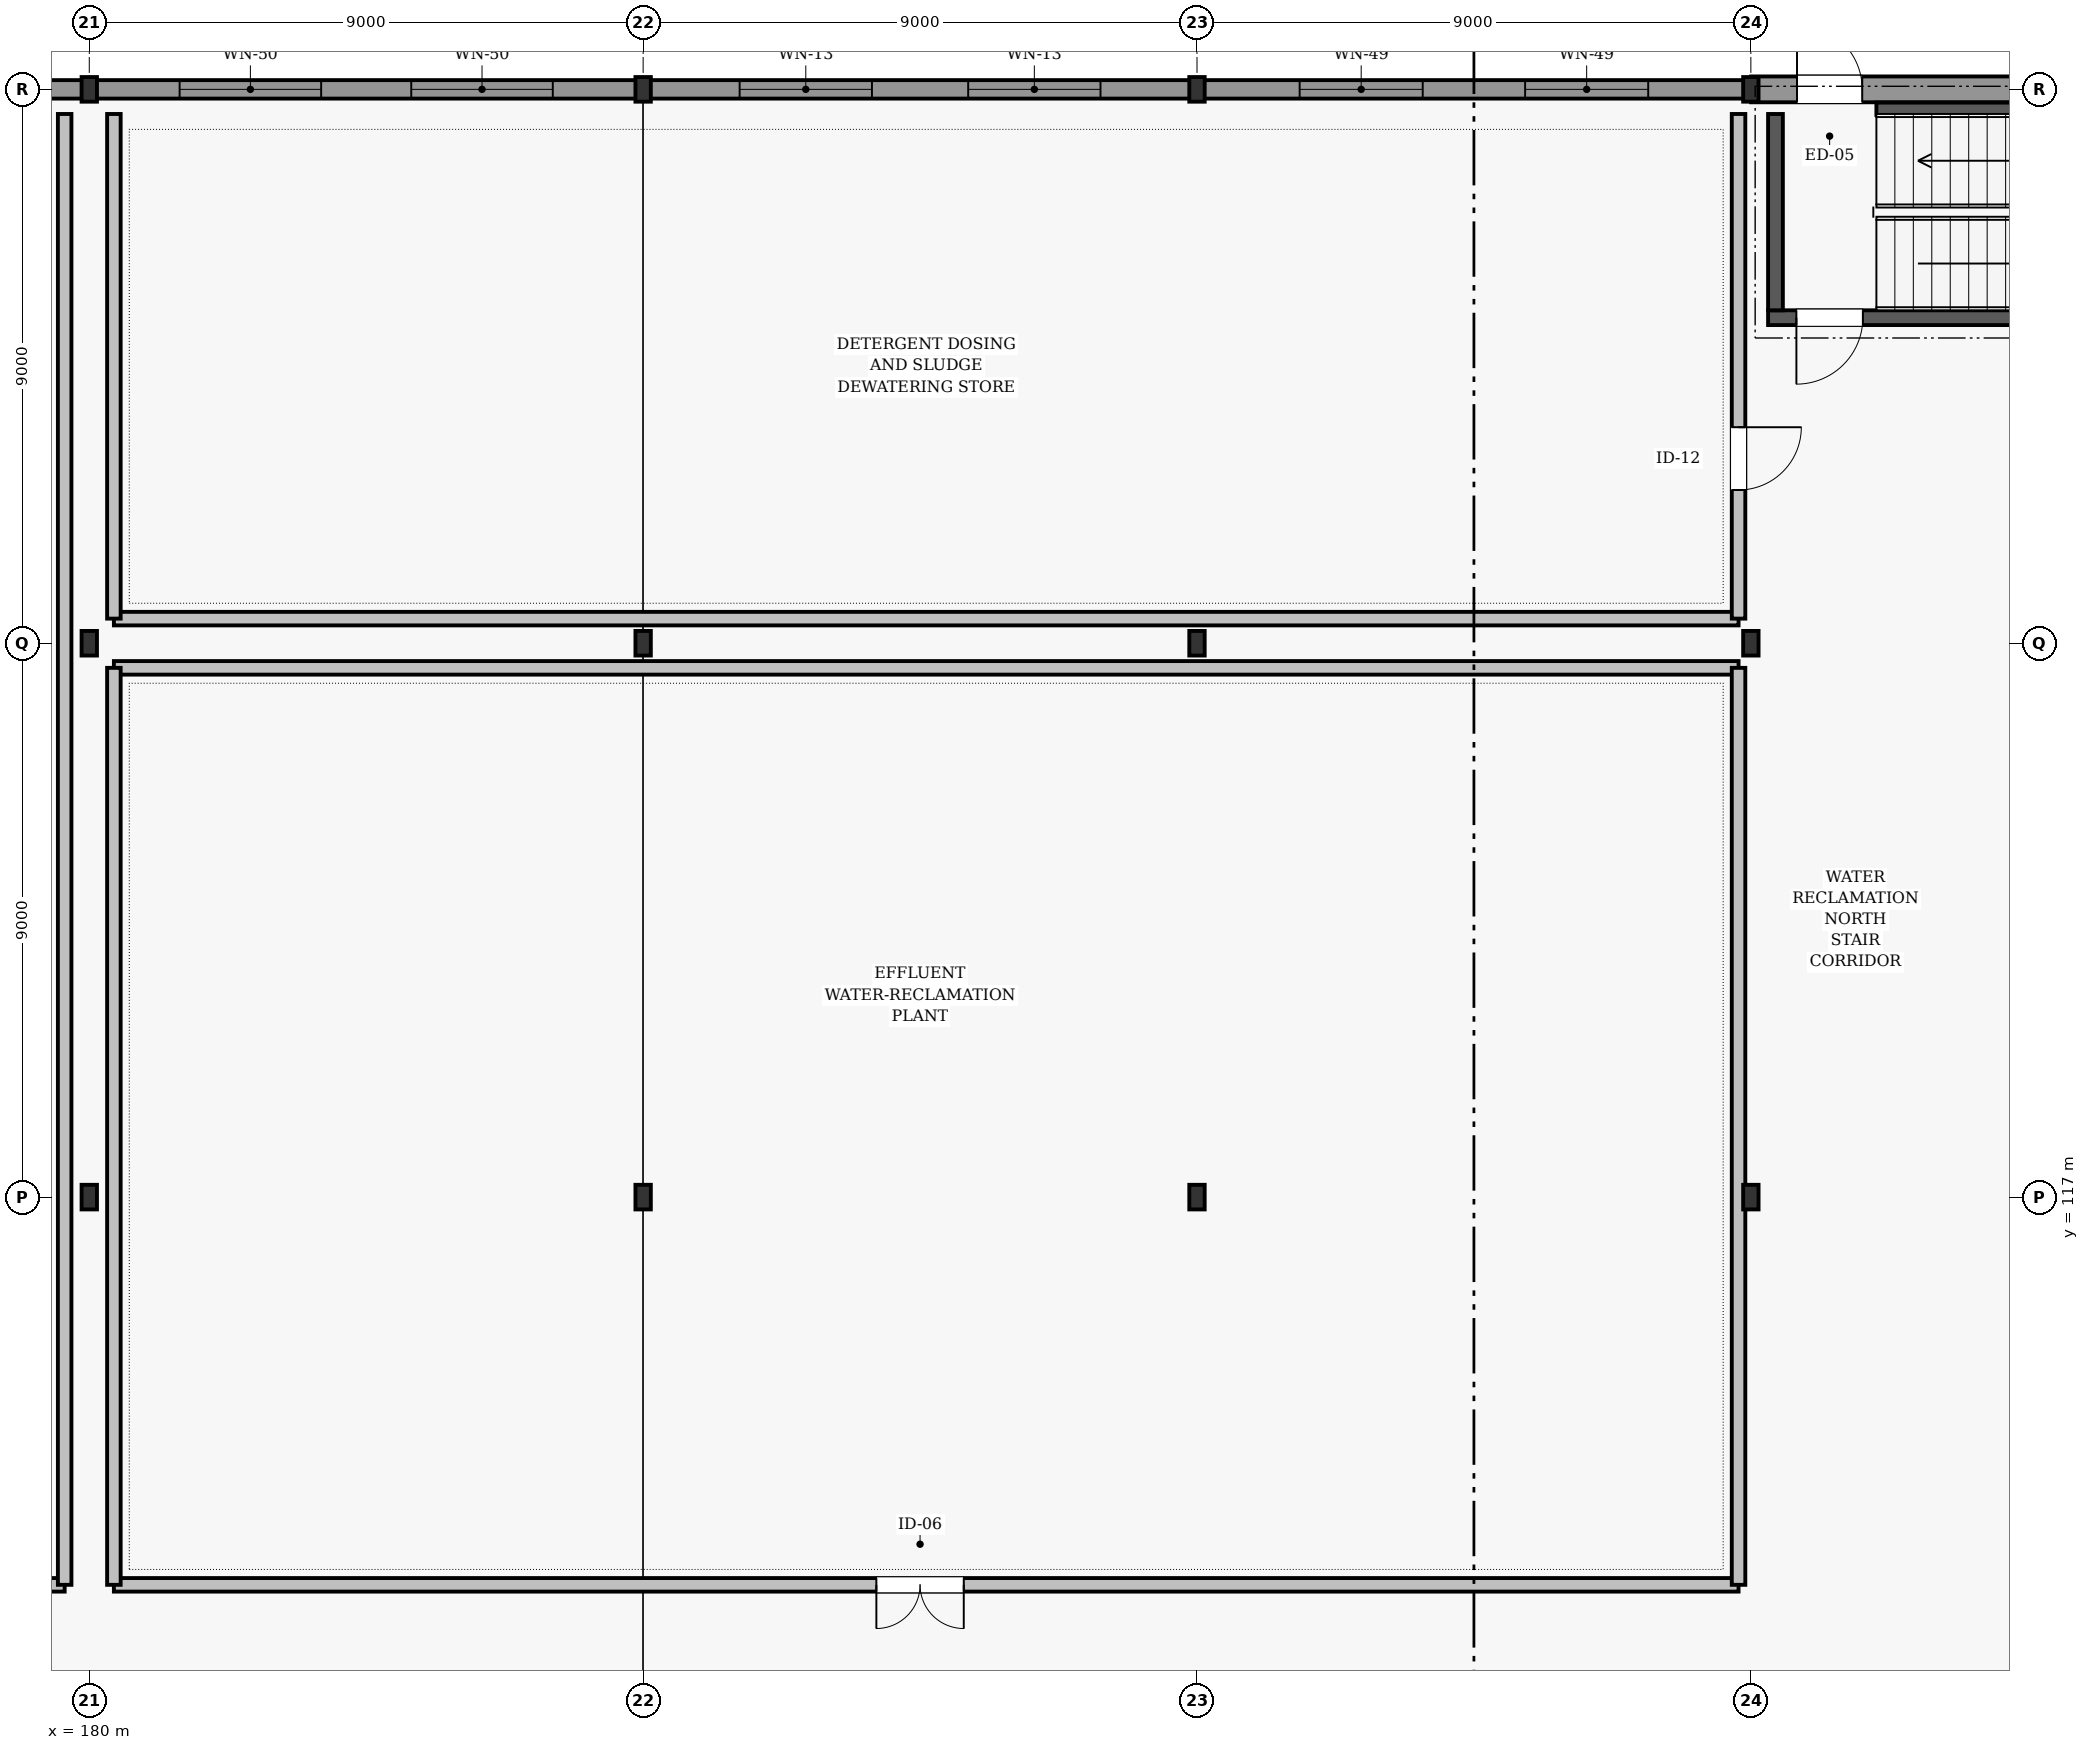
"""IFC4 building model, lengths in metres.
Left out: names, types, materials, properties, quantities, classifications, styles, units other than length and angle.
Written with IfcOpenShell. Run it as: python <this file> out.ifc"""

import sys

from ifc_helpers import new_model, si_unit, direction, frame, frame_2d, origin, origin_2d, place, context, subcontext, project, spatial, rectangle, i_section, extrude, element, fill, save


model = new_model("IFC4")
c1 = context("Model", 3, precision=1e-05, world=origin(), true_north=direction((0.0, 1.0)))
c2 = subcontext(c1, "Body", "Model", "MODEL_VIEW")
j1 = project(units=[si_unit("LENGTHUNIT", "METRE"), si_unit("PLANEANGLEUNIT", "RADIAN")], contexts=[c1])
p1 = place(None, origin())
s1 = spatial("IfcSite", under=j1, at=p1, CompositionType="ELEMENT")
p2 = place(p1, origin())
s2 = spatial("IfcBuilding", under=s1, at=p2, CompositionType="ELEMENT")
p3 = place(p2, origin())
s3 = spatial("IfcBuildingStorey", under=s2, at=p3, CompositionType="ELEMENT", Elevation=0.0)
for number, where, z_axis, x_axis in (
    (1, (180.0, 117.0, 0.0), (0.0, 0.0, 1.0), (1.0, 0.0, 0.0)),
    (2, (180.0, 126.0, 0.0), (0.0, 0.0, 1.0), (1.0, 0.0, 0.0)),
    (3, (180.0, 135.0, 0.0), (0.0, 0.0, 1.0), (1.0, 0.0, 0.0)),
    (4, (189.0, 117.0, 0.0), (0.0, 0.0, 1.0), (1.0, 0.0, 0.0)),
    (5, (189.0, 126.0, 0.0), (0.0, 0.0, 1.0), (1.0, 0.0, 0.0)),
    (6, (189.0, 135.0, 0.0), (0.0, 0.0, 1.0), (1.0, 0.0, 0.0)),
    (7, (198.0, 117.0, 0.0), (0.0, 0.0, 1.0), (1.0, 0.0, 0.0)),
    (8, (198.0, 126.0, 0.0), (0.0, 0.0, 1.0), (1.0, 0.0, 0.0)),
    (9, (198.0, 135.0, 0.0), (0.0, 0.0, 1.0), (1.0, 0.0, 0.0)),
    (10, (207.0, 117.0, 0.0), (0.0, 0.0, 1.0), (1.0, 0.0, 0.0)),
    (11, (207.0, 126.0, 0.0), (0.0, 0.0, 1.0), (1.0, 0.0, 0.0)),
    (12, (207.0, 135.0, 0.0), (0.0, 0.0, 1.0), (1.0, 0.0, 0.0)),
):
    element("IfcColumn", number, at=place(p3, frame(where, z_axis=z_axis, x_axis=x_axis)), inside=s3, PredefinedType="COLUMN", context=c2, shape_type="SweptSolid", body=[
        extrude(i_section(OverallWidth=0.25, OverallDepth=0.4, WebThickness=0.01, FlangeThickness=0.013, FilletRadius=0.014, at=origin_2d()), origin(), (0.0, 0.0, 1.0), 4.8),
    ])
p4 = place(p3, frame((171.004, 135.0, 0.0), z_axis=(0.0, 0.0, 1.0), x_axis=(1.0, 0.0, 0.0)))
e13 = element("IfcWall", 13, at=p4, inside=s3, PredefinedType="SOLIDWALL", context=c2, shape_type="SweptSolid", body=[
    extrude(rectangle(XDim=8.992, YDim=0.3, at=frame_2d((4.496, 0.0))), origin(), (0.0, 0.0, 1.0), 3.912),
])
p5 = place(p4, frame((1.364, 0.0, 1.45)))
e14 = element("IfcOpeningElement", 14, at=p5, cuts=e13, PredefinedType="OPENING", context=c2, shape_type="SweptSolid", body=[
    extrude(rectangle(XDim=2.45, YDim=1.2, at=frame_2d((1.225, 0.6))), frame((0.0, 0.16, 0.0), z_axis=(0.0, -1.0, 0.0), x_axis=(1.0, 0.0, 0.0)), (0.0, 0.0, 1.0), 0.32),
])
p6 = place(p4, frame((5.178, 0.0, 1.45)))
e15 = element("IfcOpeningElement", 15, at=p6, cuts=e13, PredefinedType="OPENING", context=c2, shape_type="SweptSolid", body=[
    extrude(rectangle(XDim=2.45, YDim=1.2, at=frame_2d((1.225, 0.6))), frame((0.0, 0.16, 0.0), z_axis=(0.0, -1.0, 0.0), x_axis=(1.0, 0.0, 0.0)), (0.0, 0.0, 1.0), 0.32),
])
p7 = place(p3, frame((180.004, 135.0, 0.0), z_axis=(0.0, 0.0, 1.0), x_axis=(1.0, 0.0, 0.0)))
e16 = element("IfcWall", 16, at=p7, inside=s3, PredefinedType="SOLIDWALL", context=c2, shape_type="SweptSolid", body=[
    extrude(rectangle(XDim=8.992, YDim=0.3, at=frame_2d((4.496, 0.0))), origin(), (0.0, 0.0, 1.0), 3.912),
])
p8 = place(p7, frame((1.464, 0.0, 1.5)))
e17 = element("IfcOpeningElement", 17, at=p8, cuts=e16, PredefinedType="OPENING", context=c2, shape_type="SweptSolid", body=[
    extrude(rectangle(XDim=2.3, YDim=1.16, at=frame_2d((1.15, 0.58))), frame((0.0, 0.16, 0.0), z_axis=(0.0, -1.0, 0.0), x_axis=(1.0, 0.0, 0.0)), (0.0, 0.0, 1.0), 0.32),
])
p9 = place(p7, frame((5.228, 0.0, 1.5)))
e18 = element("IfcOpeningElement", 18, at=p9, cuts=e16, PredefinedType="OPENING", context=c2, shape_type="SweptSolid", body=[
    extrude(rectangle(XDim=2.3, YDim=1.16, at=frame_2d((1.15, 0.58))), frame((0.0, 0.16, 0.0), z_axis=(0.0, -1.0, 0.0), x_axis=(1.0, 0.0, 0.0)), (0.0, 0.0, 1.0), 0.32),
])
p10 = place(p3, frame((189.004, 135.0, 0.0), z_axis=(0.0, 0.0, 1.0), x_axis=(1.0, 0.0, 0.0)))
e19 = element("IfcWall", 19, at=p10, inside=s3, PredefinedType="SOLIDWALL", context=c2, shape_type="SweptSolid", body=[
    extrude(rectangle(XDim=8.992, YDim=0.3, at=frame_2d((4.496, 0.0))), origin(), (0.0, 0.0, 1.0), 3.912),
])
p11 = place(p10, frame((1.564, 0.0, 1.5)))
e20 = element("IfcOpeningElement", 20, at=p11, cuts=e19, PredefinedType="OPENING", context=c2, shape_type="SweptSolid", body=[
    extrude(rectangle(XDim=2.15, YDim=1.12, at=frame_2d((1.075, 0.56))), frame((0.0, 0.16, 0.0), z_axis=(0.0, -1.0, 0.0), x_axis=(1.0, 0.0, 0.0)), (0.0, 0.0, 1.0), 0.32),
])
p12 = place(p10, frame((5.278, 0.0, 1.5)))
e21 = element("IfcOpeningElement", 21, at=p12, cuts=e19, PredefinedType="OPENING", context=c2, shape_type="SweptSolid", body=[
    extrude(rectangle(XDim=2.15, YDim=1.12, at=frame_2d((1.075, 0.56))), frame((0.0, 0.16, 0.0), z_axis=(0.0, -1.0, 0.0), x_axis=(1.0, 0.0, 0.0)), (0.0, 0.0, 1.0), 0.32),
])
p13 = place(p3, frame((198.004, 135.0, 0.0), z_axis=(0.0, 0.0, 1.0), x_axis=(1.0, 0.0, 0.0)))
e22 = element("IfcWall", 22, at=p13, inside=s3, PredefinedType="SOLIDWALL", context=c2, shape_type="SweptSolid", body=[
    extrude(rectangle(XDim=8.992, YDim=0.3, at=frame_2d((4.496, 0.0))), origin(), (0.0, 0.0, 1.0), 3.912),
])
p14 = place(p13, frame((1.664, 0.0, 1.5)))
e23 = element("IfcOpeningElement", 23, at=p14, cuts=e22, PredefinedType="OPENING", context=c2, shape_type="SweptSolid", body=[
    extrude(rectangle(XDim=2.0, YDim=1.08, at=frame_2d((1.0, 0.54))), frame((0.0, 0.16, 0.0), z_axis=(0.0, -1.0, 0.0), x_axis=(1.0, 0.0, 0.0)), (0.0, 0.0, 1.0), 0.32),
])
p15 = place(p13, frame((5.328, 0.0, 1.5)))
e24 = element("IfcOpeningElement", 24, at=p15, cuts=e22, PredefinedType="OPENING", context=c2, shape_type="SweptSolid", body=[
    extrude(rectangle(XDim=2.0, YDim=1.08, at=frame_2d((1.0, 0.54))), frame((0.0, 0.16, 0.0), z_axis=(0.0, -1.0, 0.0), x_axis=(1.0, 0.0, 0.0)), (0.0, 0.0, 1.0), 0.32),
])
p16 = place(p3, frame((207.004, 135.0, 0.0), z_axis=(0.0, 0.0, 1.0), x_axis=(1.0, 0.0, 0.0)))
e25 = element("IfcWall", 25, at=p16, inside=s3, PredefinedType="SOLIDWALL", context=c2, shape_type="SweptSolid", body=[
    extrude(rectangle(XDim=8.992, YDim=0.42, at=frame_2d((4.496, 0.0))), origin(), (0.0, 0.0, 1.0), 3.912),
])
p17 = place(p16, frame((0.746, 0.0, 0.0)))
e26 = element("IfcOpeningElement", 26, at=p17, cuts=e25, PredefinedType="OPENING", context=c2, shape_type="SweptSolid", body=[
    extrude(rectangle(XDim=1.06, YDim=2.1, at=frame_2d((0.53, 1.05))), frame((0.0, 0.22, 0.0), z_axis=(0.0, -1.0, 0.0), x_axis=(1.0, 0.0, 0.0)), (0.0, 0.0, 1.0), 0.44),
])
p18 = place(p3, frame((207.28, 131.29, 0.0), z_axis=(0.0, 0.0, 1.0), x_axis=(1.0, 0.0, 0.0)))
e27 = element("IfcWall", 27, at=p18, inside=s3, PredefinedType="SHEAR", context=c2, shape_type="SweptSolid", body=[
    extrude(rectangle(XDim=8.44, YDim=0.24, at=frame_2d((4.22, 0.0))), origin(), (0.0, 0.0, 1.0), 4.55),
])
p19 = place(p18, frame((0.46, 0.0, 0.0)))
e28 = element("IfcOpeningElement", 28, at=p19, cuts=e27, PredefinedType="OPENING", context=c2, shape_type="SweptSolid", body=[
    extrude(rectangle(XDim=1.08, YDim=2.08, at=frame_2d((0.54, 1.04))), frame((0.0, 0.13, 0.0), z_axis=(0.0, -1.0, 0.0), x_axis=(1.0, 0.0, 0.0)), (0.0, 0.0, 1.0), 0.26),
])
p20 = place(p3, frame((209.04, 134.685, 0.0), z_axis=(0.0, 0.0, 1.0), x_axis=(1.0, 0.0, 0.0)))
e29 = element("IfcWall", 29, at=p20, inside=s3, PredefinedType="SHEAR", context=c2, shape_type="SweptSolid", body=[
    extrude(rectangle(XDim=6.44, YDim=0.2, at=frame_2d((3.22, 0.0))), origin(), (0.0, 0.0, 1.0), 4.55),
])
p21 = place(p3, frame((207.4, 131.41, 0.0), z_axis=(0.0, 0.0, 1.0), x_axis=(0.0, 1.0, 0.0)))
e30 = element("IfcWall", 30, at=p21, inside=s3, PredefinedType="SHEAR", context=c2, shape_type="SweptSolid", body=[
    extrude(rectangle(XDim=3.19, YDim=0.24, at=frame_2d((1.595, 0.0))), origin(), (0.0, 0.0, 1.0), 4.55),
])
p22 = place(p3, frame((162.4, 110.7, 0.0), z_axis=(0.0, 0.0, 1.0), x_axis=(1.0, 0.0, 0.0)))
e31 = element("IfcWall", 31, at=p22, inside=s3, PredefinedType="SOLIDWALL", context=c2, shape_type="SweptSolid", body=[
    extrude(rectangle(XDim=17.2, YDim=0.22, at=frame_2d((8.6, 0.0))), origin(), (0.0, 0.0, 1.0), 4.115),
])
p23 = place(p22, frame((12.34, 0.0, 0.0)))
e32 = element("IfcOpeningElement", 32, at=p23, cuts=e31, PredefinedType="OPENING", context=c2, shape_type="SweptSolid", body=[
    extrude(rectangle(XDim=1.52, YDim=2.16, at=frame_2d((0.76, 1.08))), frame((0.0, 0.12, 0.0), z_axis=(0.0, -1.0, 0.0), x_axis=(1.0, 0.0, 0.0)), (0.0, 0.0, 1.0), 0.24),
])
p24 = place(p3, frame((179.6, 110.7, 0.0), z_axis=(0.0, 0.0, 1.0), x_axis=(0.0, 1.0, 0.0)))
e33 = element("IfcWall", 33, at=p24, inside=s3, PredefinedType="SOLIDWALL", context=c2, shape_type="SweptSolid", body=[
    extrude(rectangle(XDim=23.9, YDim=0.22, at=frame_2d((11.95, 0.0))), origin(), (0.0, 0.0, 1.0), 4.165),
])
p25 = place(p3, frame((180.4, 110.7, 0.0), z_axis=(0.0, 0.0, 1.0), x_axis=(1.0, 0.0, 0.0)))
e34 = element("IfcWall", 34, at=p25, inside=s3, PredefinedType="SOLIDWALL", context=c2, shape_type="SweptSolid", body=[
    extrude(rectangle(XDim=26.4, YDim=0.22, at=frame_2d((13.2, 0.0))), origin(), (0.0, 0.0, 1.0), 4.115),
])
p26 = place(p25, frame((12.39, 0.0, 0.0)))
e35 = element("IfcOpeningElement", 35, at=p26, cuts=e34, PredefinedType="OPENING", context=c2, shape_type="SweptSolid", body=[
    extrude(rectangle(XDim=1.42, YDim=2.12, at=frame_2d((0.71, 1.06))), frame((0.0, 0.12, 0.0), z_axis=(0.0, -1.0, 0.0), x_axis=(1.0, 0.0, 0.0)), (0.0, 0.0, 1.0), 0.24),
])
p27 = place(p3, frame((180.4, 125.6, 0.0), z_axis=(0.0, 0.0, 1.0), x_axis=(1.0, 0.0, 0.0)))
e36 = element("IfcWall", 36, at=p27, inside=s3, PredefinedType="SOLIDWALL", context=c2, shape_type="SweptSolid", body=[
    extrude(rectangle(XDim=26.4, YDim=0.22, at=frame_2d((13.2, 0.0))), origin(), (0.0, 0.0, 1.0), 4.115),
])
for number, where, z_axis, x_axis in (
    (37, (180.4, 110.7, 0.0), (0.0, 0.0, 1.0), (0.0, 1.0, 0.0)),
    (38, (206.8, 110.7, 0.0), (0.0, 0.0, 1.0), (0.0, 1.0, 0.0)),
):
    element("IfcWall", number, at=place(p3, frame(where, z_axis=z_axis, x_axis=x_axis)), inside=s3, PredefinedType="SOLIDWALL", context=c2, shape_type="SweptSolid", body=[
        extrude(rectangle(XDim=14.9, YDim=0.22, at=frame_2d((7.45, 0.0))), origin(), (0.0, 0.0, 1.0), 4.165),
    ])
p28 = place(p3, frame((180.4, 126.4, 0.0), z_axis=(0.0, 0.0, 1.0), x_axis=(1.0, 0.0, 0.0)))
e39 = element("IfcWall", 39, at=p28, inside=s3, PredefinedType="SOLIDWALL", context=c2, shape_type="SweptSolid", body=[
    extrude(rectangle(XDim=26.4, YDim=0.22, at=frame_2d((13.2, 0.0))), origin(), (0.0, 0.0, 1.0), 4.115),
])
p29 = place(p3, frame((180.4, 126.4, 0.0), z_axis=(0.0, 0.0, 1.0), x_axis=(0.0, 1.0, 0.0)))
e40 = element("IfcWall", 40, at=p29, inside=s3, PredefinedType="SOLIDWALL", context=c2, shape_type="SweptSolid", body=[
    extrude(rectangle(XDim=8.2, YDim=0.22, at=frame_2d((4.1, 0.0))), origin(), (0.0, 0.0, 1.0), 4.55),
])
p30 = place(p3, frame((206.8, 126.4, 0.0), z_axis=(0.0, 0.0, 1.0), x_axis=(0.0, 1.0, 0.0)))
e41 = element("IfcWall", 41, at=p30, inside=s3, PredefinedType="SOLIDWALL", context=c2, shape_type="SweptSolid", body=[
    extrude(rectangle(XDim=8.2, YDim=0.22, at=frame_2d((4.1, 0.0))), origin(), (0.0, 0.0, 1.0), 4.55),
])
p31 = place(p30, frame((2.09, 0.0, 0.0)))
e42 = element("IfcOpeningElement", 42, at=p31, cuts=e41, PredefinedType="OPENING", context=c2, shape_type="SweptSolid", body=[
    extrude(rectangle(XDim=1.02, YDim=2.1, at=frame_2d((0.51, 1.05))), frame((0.0, 0.12, 0.0), z_axis=(0.0, -1.0, 0.0), x_axis=(1.0, 0.0, 0.0)), (0.0, 0.0, 1.0), 0.24),
])
p32 = place(p8, origin())
e43 = element("IfcWindow", 43, at=p32, inside=s3, PartitioningType="SINGLE_PANEL", PredefinedType="WINDOW", context=c2, shape_type="SweptSolid", body=[
    extrude(rectangle(XDim=2.3, YDim=1.16, at=frame_2d((1.15, 0.58))), frame((0.0, 0.03, 0.0), z_axis=(0.0, -1.0, 0.0), x_axis=(1.0, 0.0, 0.0)), (0.0, 0.0, 1.0), 0.06),
])
fill(e17, e43)
p33 = place(p9, origin())
e44 = element("IfcWindow", 44, at=p33, inside=s3, PartitioningType="SINGLE_PANEL", PredefinedType="WINDOW", context=c2, shape_type="SweptSolid", body=[
    extrude(rectangle(XDim=2.3, YDim=1.16, at=frame_2d((1.15, 0.58))), frame((0.0, 0.03, 0.0), z_axis=(0.0, -1.0, 0.0), x_axis=(1.0, 0.0, 0.0)), (0.0, 0.0, 1.0), 0.06),
])
fill(e18, e44)
p34 = place(p11, origin())
e45 = element("IfcWindow", 45, at=p34, inside=s3, PartitioningType="SINGLE_PANEL", PredefinedType="WINDOW", context=c2, shape_type="SweptSolid", body=[
    extrude(rectangle(XDim=2.15, YDim=1.12, at=frame_2d((1.075, 0.56))), frame((0.0, 0.03, 0.0), z_axis=(0.0, -1.0, 0.0), x_axis=(1.0, 0.0, 0.0)), (0.0, 0.0, 1.0), 0.06),
])
fill(e20, e45)
p35 = place(p12, origin())
e46 = element("IfcWindow", 46, at=p35, inside=s3, PartitioningType="SINGLE_PANEL", PredefinedType="WINDOW", context=c2, shape_type="SweptSolid", body=[
    extrude(rectangle(XDim=2.15, YDim=1.12, at=frame_2d((1.075, 0.56))), frame((0.0, 0.03, 0.0), z_axis=(0.0, -1.0, 0.0), x_axis=(1.0, 0.0, 0.0)), (0.0, 0.0, 1.0), 0.06),
])
fill(e21, e46)
p36 = place(p14, origin())
e47 = element("IfcWindow", 47, at=p36, inside=s3, PartitioningType="SINGLE_PANEL", PredefinedType="WINDOW", context=c2, shape_type="SweptSolid", body=[
    extrude(rectangle(XDim=2.0, YDim=1.08, at=frame_2d((1.0, 0.54))), frame((0.0, 0.03, 0.0), z_axis=(0.0, -1.0, 0.0), x_axis=(1.0, 0.0, 0.0)), (0.0, 0.0, 1.0), 0.06),
])
fill(e23, e47)
p37 = place(p15, origin())
e48 = element("IfcWindow", 48, at=p37, inside=s3, PartitioningType="SINGLE_PANEL", PredefinedType="WINDOW", context=c2, shape_type="SweptSolid", body=[
    extrude(rectangle(XDim=2.0, YDim=1.08, at=frame_2d((1.0, 0.54))), frame((0.0, 0.03, 0.0), z_axis=(0.0, -1.0, 0.0), x_axis=(1.0, 0.0, 0.0)), (0.0, 0.0, 1.0), 0.06),
])
fill(e24, e48)
p38 = place(p17, origin())
e49 = element("IfcDoor", 49, at=p38, inside=s3, OperationType="SINGLE_SWING_LEFT", PredefinedType="DOOR", context=c2, shape_type="SweptSolid", body=[
    extrude(rectangle(XDim=1.06, YDim=2.1, at=frame_2d((0.53, 1.05))), frame((0.0, 0.025, 0.0), z_axis=(0.0, -1.0, 0.0), x_axis=(1.0, 0.0, 0.0)), (0.0, 0.0, 1.0), 0.05),
])
fill(e26, e49)
p39 = place(p19, frame((1.08, 0.0, 0.0), z_axis=(0.0, 0.0, 1.0), x_axis=(-1.0, 0.0, 0.0)))
e50 = element("IfcDoor", 50, at=p39, inside=s3, OperationType="SINGLE_SWING_LEFT", PredefinedType="DOOR", context=c2, shape_type="SweptSolid", body=[
    extrude(rectangle(XDim=1.08, YDim=2.08, at=frame_2d((0.54, 1.04))), frame((0.0, 0.025, 0.0), z_axis=(0.0, -1.0, 0.0), x_axis=(1.0, 0.0, 0.0)), (0.0, 0.0, 1.0), 0.05),
])
fill(e28, e50)
p40 = place(p26, frame((1.42, 0.0, 0.0), z_axis=(0.0, 0.0, 1.0), x_axis=(-1.0, 0.0, 0.0)))
e51 = element("IfcDoor", 51, at=p40, inside=s3, OperationType="DOUBLE_SWING_LEFT", PredefinedType="DOOR", context=c2, shape_type="SweptSolid", body=[
    extrude(rectangle(XDim=1.42, YDim=2.12, at=frame_2d((0.71, 1.06))), frame((0.0, 0.025, 0.0), z_axis=(0.0, -1.0, 0.0), x_axis=(1.0, 0.0, 0.0)), (0.0, 0.0, 1.0), 0.05),
])
fill(e35, e51)
p41 = place(p31, frame((1.02, 0.0, 0.0), z_axis=(0.0, 0.0, 1.0), x_axis=(-1.0, 0.0, 0.0)))
e52 = element("IfcDoor", 52, at=p41, inside=s3, OperationType="SINGLE_SWING_RIGHT", PredefinedType="DOOR", context=c2, shape_type="SweptSolid", body=[
    extrude(rectangle(XDim=1.02, YDim=2.1, at=frame_2d((0.51, 1.05))), frame((0.0, 0.025, 0.0), z_axis=(0.0, -1.0, 0.0), x_axis=(1.0, 0.0, 0.0)), (0.0, 0.0, 1.0), 0.05),
])
fill(e42, e52)
save(model, sys.argv[1])
